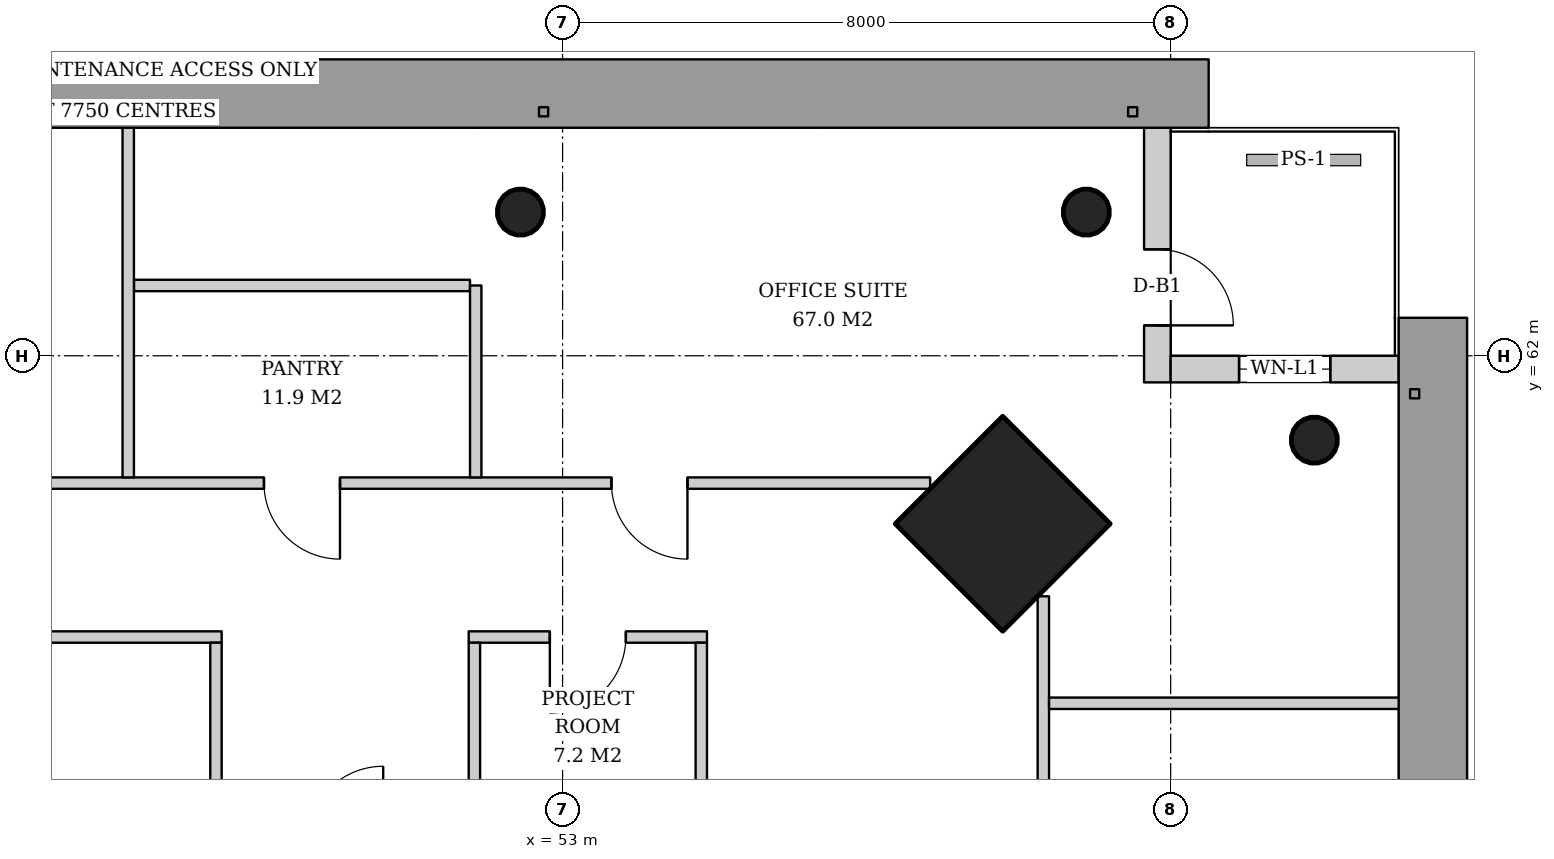
"""IFC4 building model, lengths in metres.
Left out: names, types, materials, properties, quantities, classifications, styles, units other than length and angle.
Written with IfcOpenShell. Run it as: python <this file> out.ifc"""

import sys

from ifc_helpers import new_model, si_unit, direction, frame, frame_2d, origin, origin_2d, place, context, subcontext, project, spatial, rectangle, hollow_circle, extrude, element, fill, save


model = new_model("IFC4")
c1 = context("Model", 3, precision=1e-05, world=origin(), true_north=direction((0.0, 1.0)))
c2 = subcontext(c1, "Body", "Model", "MODEL_VIEW")
j1 = project(units=[si_unit("LENGTHUNIT", "METRE"), si_unit("PLANEANGLEUNIT", "RADIAN")], contexts=[c1])
p1 = place(None, origin())
s1 = spatial("IfcSite", under=j1, at=p1, CompositionType="ELEMENT")
p2 = place(p1, origin())
s2 = spatial("IfcBuilding", under=s1, at=p2, CompositionType="ELEMENT")
p3 = place(p2, frame((0.0, 0.0, 211.0)))
s3 = spatial("IfcBuildingStorey", under=s2, at=p3, CompositionType="ELEMENT", Elevation=211.0)
p4 = place(p3, frame((58.829, 59.829, 0.0), z_axis=(-0.031962158256, -0.031962158256, 0.998977898093), x_axis=(0.707106781187, -0.707106781187, 0.0)))
e1 = element("IfcColumn", 1, at=p4, inside=s3, PredefinedType="COLUMN", context=c2, shape_type="SweptSolid", body=[
    extrude(rectangle(XDim=2.0, YDim=2.0, at=origin_2d()), origin(), (0.0, 0.0, 1.0), 3.804),
])
for number, where, z_axis, x_axis in (
    (2, (62.928, 60.928, 0.0), (-0.032, -0.032, 0.999), (0.707, -0.707, 0.0)),
    (3, (59.928, 63.928, 0.0), (-0.032, -0.032, 0.999), (0.707, -0.707, 0.0)),
):
    element("IfcColumn", number, at=place(p3, frame(where, z_axis=z_axis, x_axis=x_axis)), inside=s3, PredefinedType="COLUMN", context=c2, shape_type="SweptSolid", body=[
        extrude(hollow_circle(Radius=0.305, WallThickness=0.025, at=origin_2d()), origin(), (0.0, 0.0, 1.0), 3.804),
    ])
p5 = place(p3, frame((52.464, 63.928, 0.0), z_axis=(-0.015987237665, -0.031910269556, 0.999362868496), x_axis=(0.894067115991, -0.447933021895, 0.0)))
e4 = element("IfcColumn", 4, at=p5, inside=s3, PredefinedType="COLUMN", context=c2, shape_type="SweptSolid", body=[
    extrude(hollow_circle(Radius=0.305, WallThickness=0.025, at=origin_2d()), origin(), (0.0, 0.0, 1.0), 3.802),
])
p6 = place(p3, frame((60.825, 65.0, 0.0), z_axis=(0.0, 0.0, 1.0), x_axis=(0.0, -1.0, 0.0)))
e5 = element("IfcWall", 5, at=p6, inside=s3, PredefinedType="SOLIDWALL", context=c2, shape_type="SweptSolid", body=[
    extrude(rectangle(XDim=3.35, YDim=0.35, at=frame_2d((1.675, 0.0))), origin(), (0.0, 0.0, 1.0), 3.62),
])
p7 = place(p6, frame((1.6, 0.0, 0.0)))
e6 = element("IfcOpeningElement", 6, at=p7, cuts=e5, PredefinedType="OPENING", context=c2, shape_type="SweptSolid", body=[
    extrude(rectangle(XDim=1.0, YDim=2.4, at=frame_2d((0.5, 1.2))), frame((0.0, 0.185, 0.0), z_axis=(0.0, -1.0, 0.0), x_axis=(1.0, 0.0, 0.0)), (0.0, 0.0, 1.0), 0.37),
])
p8 = place(p3, frame((61.0, 61.825, 0.0), z_axis=(0.0, 0.0, 1.0), x_axis=(1.0, 0.0, 0.0)))
e7 = element("IfcWall", 7, at=p8, inside=s3, PredefinedType="SOLIDWALL", context=c2, shape_type="SweptSolid", body=[
    extrude(rectangle(XDim=3.0, YDim=0.35, at=frame_2d((1.5, 0.0))), origin(), (0.0, 0.0, 1.0), 3.62),
])
p9 = place(p8, frame((0.9, 0.0, 0.6)))
e8 = element("IfcOpeningElement", 8, at=p9, cuts=e7, PredefinedType="OPENING", context=c2, shape_type="SweptSolid", body=[
    extrude(rectangle(XDim=1.2, YDim=2.55, at=frame_2d((0.6, 1.275))), frame((0.0, 0.185, 0.0), z_axis=(0.0, -1.0, 0.0), x_axis=(1.0, 0.0, 0.0)), (0.0, 0.0, 1.0), 0.37),
])
p10 = place(p3, frame((54.9, 58.3, 0.0), z_axis=(0.0, 0.0, 1.0), x_axis=(-1.0, 0.0, 0.0)))
e9 = element("IfcWall", 9, at=p10, inside=s3, PredefinedType="PARTITIONING", context=c2, shape_type="SweptSolid", body=[
    extrude(rectangle(XDim=3.135, YDim=0.15, at=frame_2d((1.567, 0.0))), origin(), (0.0, 0.0, 1.0), 2.92),
])
p11 = place(p10, frame((1.067, 0.0, 0.0)))
e10 = element("IfcOpeningElement", 10, at=p11, cuts=e9, PredefinedType="OPENING", context=c2, shape_type="SweptSolid", body=[
    extrude(rectangle(XDim=1.0, YDim=2.1, at=frame_2d((0.5, 1.05))), frame((0.0, 0.085, 0.0), z_axis=(0.0, -1.0, 0.0), x_axis=(1.0, 0.0, 0.0)), (0.0, 0.0, 1.0), 0.17),
])
p12 = place(p3, frame((54.825, 55.9, 0.0), z_axis=(0.0, 0.0, 1.0), x_axis=(0.0, 1.0, 0.0)))
e11 = element("IfcWall", 11, at=p12, inside=s3, PredefinedType="PARTITIONING", context=c2, shape_type="SweptSolid", body=[
    extrude(rectangle(XDim=2.325, YDim=0.15, at=frame_2d((1.163, 0.0))), origin(), (0.0, 0.0, 1.0), 2.867),
])
p13 = place(p3, frame((51.84, 55.9, 0.0), z_axis=(0.0, 0.0, 1.0), x_axis=(0.0, 1.0, 0.0)))
e12 = element("IfcWall", 12, at=p13, inside=s3, PredefinedType="PARTITIONING", context=c2, shape_type="SweptSolid", body=[
    extrude(rectangle(XDim=2.325, YDim=0.15, at=frame_2d((1.163, 0.0))), origin(), (0.0, 0.0, 1.0), 3.62),
])
p14 = place(p3, frame((48.515, 58.3, 0.0), z_axis=(0.0, 0.0, 1.0), x_axis=(-1.0, 0.0, 0.0)))
e13 = element("IfcWall", 13, at=p14, inside=s3, PredefinedType="PARTITIONING", context=c2, shape_type="SweptSolid", body=[
    extrude(rectangle(XDim=7.307, YDim=0.15, at=frame_2d((3.654, 0.0))), origin(), (0.0, 0.0, 1.0), 2.867),
])
p15 = place(p14, frame((3.154, 0.0, 0.0)))
e14 = element("IfcOpeningElement", 14, at=p15, cuts=e13, PredefinedType="OPENING", context=c2, shape_type="SweptSolid", body=[
    extrude(rectangle(XDim=1.0, YDim=2.1, at=frame_2d((0.5, 1.05))), frame((0.0, 0.085, 0.0), z_axis=(0.0, -1.0, 0.0), x_axis=(1.0, 0.0, 0.0)), (0.0, 0.0, 1.0), 0.17),
])
p16 = place(p3, frame((48.44, 55.9, 0.0), z_axis=(0.0, 0.0, 1.0), x_axis=(0.0, 1.0, 0.0)))
e15 = element("IfcWall", 15, at=p16, inside=s3, PredefinedType="PARTITIONING", context=c2, shape_type="SweptSolid", body=[
    extrude(rectangle(XDim=2.325, YDim=0.15, at=frame_2d((1.163, 0.0))), origin(), (0.0, 0.0, 1.0), 3.62),
])
p17 = place(p3, frame((59.325, 33.164, 0.0), z_axis=(0.0, 0.0, 1.0), x_axis=(0.0, 1.0, 0.0)))
e16 = element("IfcWall", 16, at=p17, inside=s3, PredefinedType="PARTITIONING", context=c2, shape_type="SweptSolid", body=[
    extrude(rectangle(XDim=25.671, YDim=0.15, at=frame_2d((12.836, 0.0))), origin(), (0.0, 0.0, 1.0), 2.867),
])
p18 = place(p17, frame((3.193, 0.0, 0.0)))
e17 = element("IfcOpeningElement", 17, at=p18, cuts=e16, PredefinedType="OPENING", context=c2, shape_type="SweptSolid", body=[
    extrude(rectangle(XDim=1.0, YDim=2.1, at=frame_2d((0.5, 1.05))), frame((0.0, 0.085, 0.0), z_axis=(0.0, -1.0, 0.0), x_axis=(1.0, 0.0, 0.0)), (0.0, 0.0, 1.0), 0.17),
])
p19 = place(p17, frame((7.764, 0.0, 0.0)))
e18 = element("IfcOpeningElement", 18, at=p19, cuts=e16, PredefinedType="OPENING", context=c2, shape_type="SweptSolid", body=[
    extrude(rectangle(XDim=1.0, YDim=2.1, at=frame_2d((0.5, 1.05))), frame((0.0, 0.085, 0.0), z_axis=(0.0, -1.0, 0.0), x_axis=(1.0, 0.0, 0.0)), (0.0, 0.0, 1.0), 0.17),
])
p20 = place(p17, frame((12.336, 0.0, 0.0)))
e19 = element("IfcOpeningElement", 19, at=p20, cuts=e16, PredefinedType="OPENING", context=c2, shape_type="SweptSolid", body=[
    extrude(rectangle(XDim=1.0, YDim=2.1, at=frame_2d((0.5, 1.05))), frame((0.0, 0.085, 0.0), z_axis=(0.0, -1.0, 0.0), x_axis=(1.0, 0.0, 0.0)), (0.0, 0.0, 1.0), 0.17),
])
p21 = place(p17, frame((16.907, 0.0, 0.0)))
e20 = element("IfcOpeningElement", 20, at=p21, cuts=e16, PredefinedType="OPENING", context=c2, shape_type="SweptSolid", body=[
    extrude(rectangle(XDim=1.0, YDim=2.1, at=frame_2d((0.5, 1.05))), frame((0.0, 0.085, 0.0), z_axis=(0.0, -1.0, 0.0), x_axis=(1.0, 0.0, 0.0)), (0.0, 0.0, 1.0), 0.17),
])
p22 = place(p17, frame((21.479, 0.0, 0.0)))
e21 = element("IfcOpeningElement", 21, at=p22, cuts=e16, PredefinedType="OPENING", context=c2, shape_type="SweptSolid", body=[
    extrude(rectangle(XDim=1.0, YDim=2.1, at=frame_2d((0.5, 1.05))), frame((0.0, 0.085, 0.0), z_axis=(0.0, -1.0, 0.0), x_axis=(1.0, 0.0, 0.0)), (0.0, 0.0, 1.0), 0.17),
])
p23 = place(p3, frame((59.4, 57.428, 0.0), z_axis=(0.0, 0.0, 1.0), x_axis=(1.0, 0.0, 0.0)))
e22 = element("IfcWall", 22, at=p23, inside=s3, PredefinedType="PARTITIONING", context=c2, shape_type="SweptSolid", body=[
    extrude(rectangle(XDim=4.64, YDim=0.15, at=frame_2d((2.32, 0.0))), origin(), (0.0, 0.0, 1.0), 3.12),
])
p24 = place(p3, frame((51.782, 62.925, 0.0), z_axis=(0.0, 0.0, 1.0), x_axis=(-1.0, 0.0, 0.0)))
e23 = element("IfcWall", 23, at=p24, inside=s3, PredefinedType="PARTITIONING", context=c2, shape_type="SweptSolid", body=[
    extrude(rectangle(XDim=4.422, YDim=0.15, at=frame_2d((2.211, 0.0))), origin(), (0.0, 0.0, 1.0), 2.867),
])
p25 = place(p3, frame((57.836, 60.325, 0.0), z_axis=(0.0, 0.0, 1.0), x_axis=(-1.0, 0.0, 0.0)))
e24 = element("IfcWall", 24, at=p25, inside=s3, PredefinedType="PARTITIONING", context=c2, shape_type="SweptSolid", body=[
    extrude(rectangle(XDim=25.671, YDim=0.15, at=frame_2d((12.836, 0.0))), origin(), (0.0, 0.0, 1.0), 2.867),
])
p26 = place(p25, frame((3.193, 0.0, 0.0)))
e25 = element("IfcOpeningElement", 25, at=p26, cuts=e24, PredefinedType="OPENING", context=c2, shape_type="SweptSolid", body=[
    extrude(rectangle(XDim=1.0, YDim=2.1, at=frame_2d((0.5, 1.05))), frame((0.0, 0.085, 0.0), z_axis=(0.0, -1.0, 0.0), x_axis=(1.0, 0.0, 0.0)), (0.0, 0.0, 1.0), 0.17),
])
p27 = place(p25, frame((7.764, 0.0, 0.0)))
e26 = element("IfcOpeningElement", 26, at=p27, cuts=e24, PredefinedType="OPENING", context=c2, shape_type="SweptSolid", body=[
    extrude(rectangle(XDim=1.0, YDim=2.1, at=frame_2d((0.5, 1.05))), frame((0.0, 0.085, 0.0), z_axis=(0.0, -1.0, 0.0), x_axis=(1.0, 0.0, 0.0)), (0.0, 0.0, 1.0), 0.17),
])
p28 = place(p25, frame((12.336, 0.0, 0.0)))
e27 = element("IfcOpeningElement", 27, at=p28, cuts=e24, PredefinedType="OPENING", context=c2, shape_type="SweptSolid", body=[
    extrude(rectangle(XDim=1.0, YDim=2.1, at=frame_2d((0.5, 1.05))), frame((0.0, 0.085, 0.0), z_axis=(0.0, -1.0, 0.0), x_axis=(1.0, 0.0, 0.0)), (0.0, 0.0, 1.0), 0.17),
])
p29 = place(p25, frame((16.907, 0.0, 0.0)))
e28 = element("IfcOpeningElement", 28, at=p29, cuts=e24, PredefinedType="OPENING", context=c2, shape_type="SweptSolid", body=[
    extrude(rectangle(XDim=1.0, YDim=2.1, at=frame_2d((0.5, 1.05))), frame((0.0, 0.085, 0.0), z_axis=(0.0, -1.0, 0.0), x_axis=(1.0, 0.0, 0.0)), (0.0, 0.0, 1.0), 0.17),
])
p30 = place(p25, frame((21.479, 0.0, 0.0)))
e29 = element("IfcOpeningElement", 29, at=p30, cuts=e24, PredefinedType="OPENING", context=c2, shape_type="SweptSolid", body=[
    extrude(rectangle(XDim=1.0, YDim=2.1, at=frame_2d((0.5, 1.05))), frame((0.0, 0.085, 0.0), z_axis=(0.0, -1.0, 0.0), x_axis=(1.0, 0.0, 0.0)), (0.0, 0.0, 1.0), 0.17),
])
p31 = place(p3, frame((51.857, 60.4, 0.0), z_axis=(0.0, 0.0, 1.0), x_axis=(0.0, 1.0, 0.0)))
e30 = element("IfcWall", 30, at=p31, inside=s3, PredefinedType="PARTITIONING", context=c2, shape_type="SweptSolid", body=[
    extrude(rectangle(XDim=2.525, YDim=0.15, at=frame_2d((1.263, 0.0))), origin(), (0.0, 0.0, 1.0), 3.62),
])
p32 = place(p3, frame((47.286, 60.4, 0.0), z_axis=(0.0, 0.0, 1.0), x_axis=(0.0, 1.0, 0.0)))
e31 = element("IfcWall", 31, at=p32, inside=s3, PredefinedType="PARTITIONING", context=c2, shape_type="SweptSolid", body=[
    extrude(rectangle(XDim=4.64, YDim=0.15, at=frame_2d((2.32, 0.0))), origin(), (0.0, 0.0, 1.0), 3.12),
])
p33 = place(p7, origin())
e32 = element("IfcDoor", 32, at=p33, inside=s3, OperationType="SINGLE_SWING_RIGHT", PredefinedType="DOOR", context=c2, shape_type="SweptSolid", body=[
    extrude(rectangle(XDim=1.0, YDim=2.4, at=frame_2d((0.5, 1.2))), frame((0.0, 0.025, 0.0), z_axis=(0.0, -1.0, 0.0), x_axis=(1.0, 0.0, 0.0)), (0.0, 0.0, 1.0), 0.05),
])
fill(e6, e32)
p34 = place(p9, origin())
e33 = element("IfcWindow", 33, at=p34, inside=s3, PartitioningType="SINGLE_PANEL", PredefinedType="WINDOW", context=c2, shape_type="SweptSolid", body=[
    extrude(rectangle(XDim=1.2, YDim=2.55, at=frame_2d((0.6, 1.275))), frame((0.0, 0.03, 0.0), z_axis=(0.0, -1.0, 0.0), x_axis=(1.0, 0.0, 0.0)), (0.0, 0.0, 1.0), 0.06),
])
fill(e8, e33)
p35 = place(p11, origin())
e34 = element("IfcDoor", 34, at=p35, inside=s3, OperationType="SINGLE_SWING_RIGHT", PredefinedType="DOOR", context=c2, shape_type="SweptSolid", body=[
    extrude(rectangle(XDim=1.0, YDim=2.1, at=frame_2d((0.5, 1.05))), frame((0.0, 0.025, 0.0), z_axis=(0.0, -1.0, 0.0), x_axis=(1.0, 0.0, 0.0)), (0.0, 0.0, 1.0), 0.05),
])
fill(e10, e34)
p36 = place(p26, origin())
e35 = element("IfcDoor", 35, at=p36, inside=s3, OperationType="SINGLE_SWING_LEFT", PredefinedType="DOOR", context=c2, shape_type="SweptSolid", body=[
    extrude(rectangle(XDim=1.0, YDim=2.1, at=frame_2d((0.5, 1.05))), frame((0.0, 0.025, 0.0), z_axis=(0.0, -1.0, 0.0), x_axis=(1.0, 0.0, 0.0)), (0.0, 0.0, 1.0), 0.05),
])
fill(e25, e35)
p37 = place(p27, origin())
e36 = element("IfcDoor", 36, at=p37, inside=s3, OperationType="SINGLE_SWING_LEFT", PredefinedType="DOOR", context=c2, shape_type="SweptSolid", body=[
    extrude(rectangle(XDim=1.0, YDim=2.1, at=frame_2d((0.5, 1.05))), frame((0.0, 0.025, 0.0), z_axis=(0.0, -1.0, 0.0), x_axis=(1.0, 0.0, 0.0)), (0.0, 0.0, 1.0), 0.05),
])
fill(e26, e36)
save(model, sys.argv[1])
